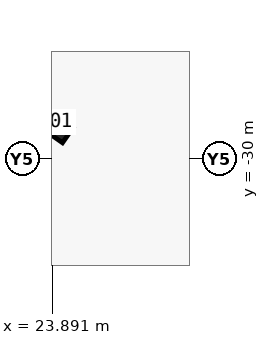
"""IFC4 building model, lengths in metres.
Left out: names, types, materials, properties, quantities, classifications, styles, units other than length and angle.
Written with IfcOpenShell. Run it as: python <this file> out.ifc"""

import sys

from ifc_helpers import new_model, si_unit, direction, frame, origin, origin_2d, place, context, subcontext, project, spatial, rectangle, extrude, element, save


model = new_model("IFC4")
c1 = context("Model", 3, precision=1e-05, world=origin(), true_north=direction((0.0, 1.0)))
c2 = subcontext(c1, "Body", "Model", "MODEL_VIEW")
j1 = project(units=[si_unit("LENGTHUNIT", "METRE"), si_unit("PLANEANGLEUNIT", "RADIAN")], contexts=[c1])
p1 = place(None, origin())
s1 = spatial("IfcSite", under=j1, at=p1, CompositionType="ELEMENT")
p2 = place(p1, origin())
s2 = spatial("IfcBuilding", under=s1, at=p2, CompositionType="ELEMENT")
p3 = place(p2, frame((0.0, 0.0, -4.5)))
s3 = spatial("IfcBuildingStorey", under=s2, at=p3, CompositionType="ELEMENT", Elevation=-4.5)
p4 = place(p3, frame((23.782, -28.799, 0.0), z_axis=(0.0, 0.0, 1.0), x_axis=(0.819152044289, -0.573576436351, 0.0)))
e1 = element("IfcColumn", 1, at=p4, inside=s3, PredefinedType="COLUMN", context=c2, shape_type="SweptSolid", body=[
    extrude(rectangle(XDim=1.5, YDim=0.6, at=origin_2d()), origin(), (0.0, 0.0, 1.0), 4.5),
])
save(model, sys.argv[1])
